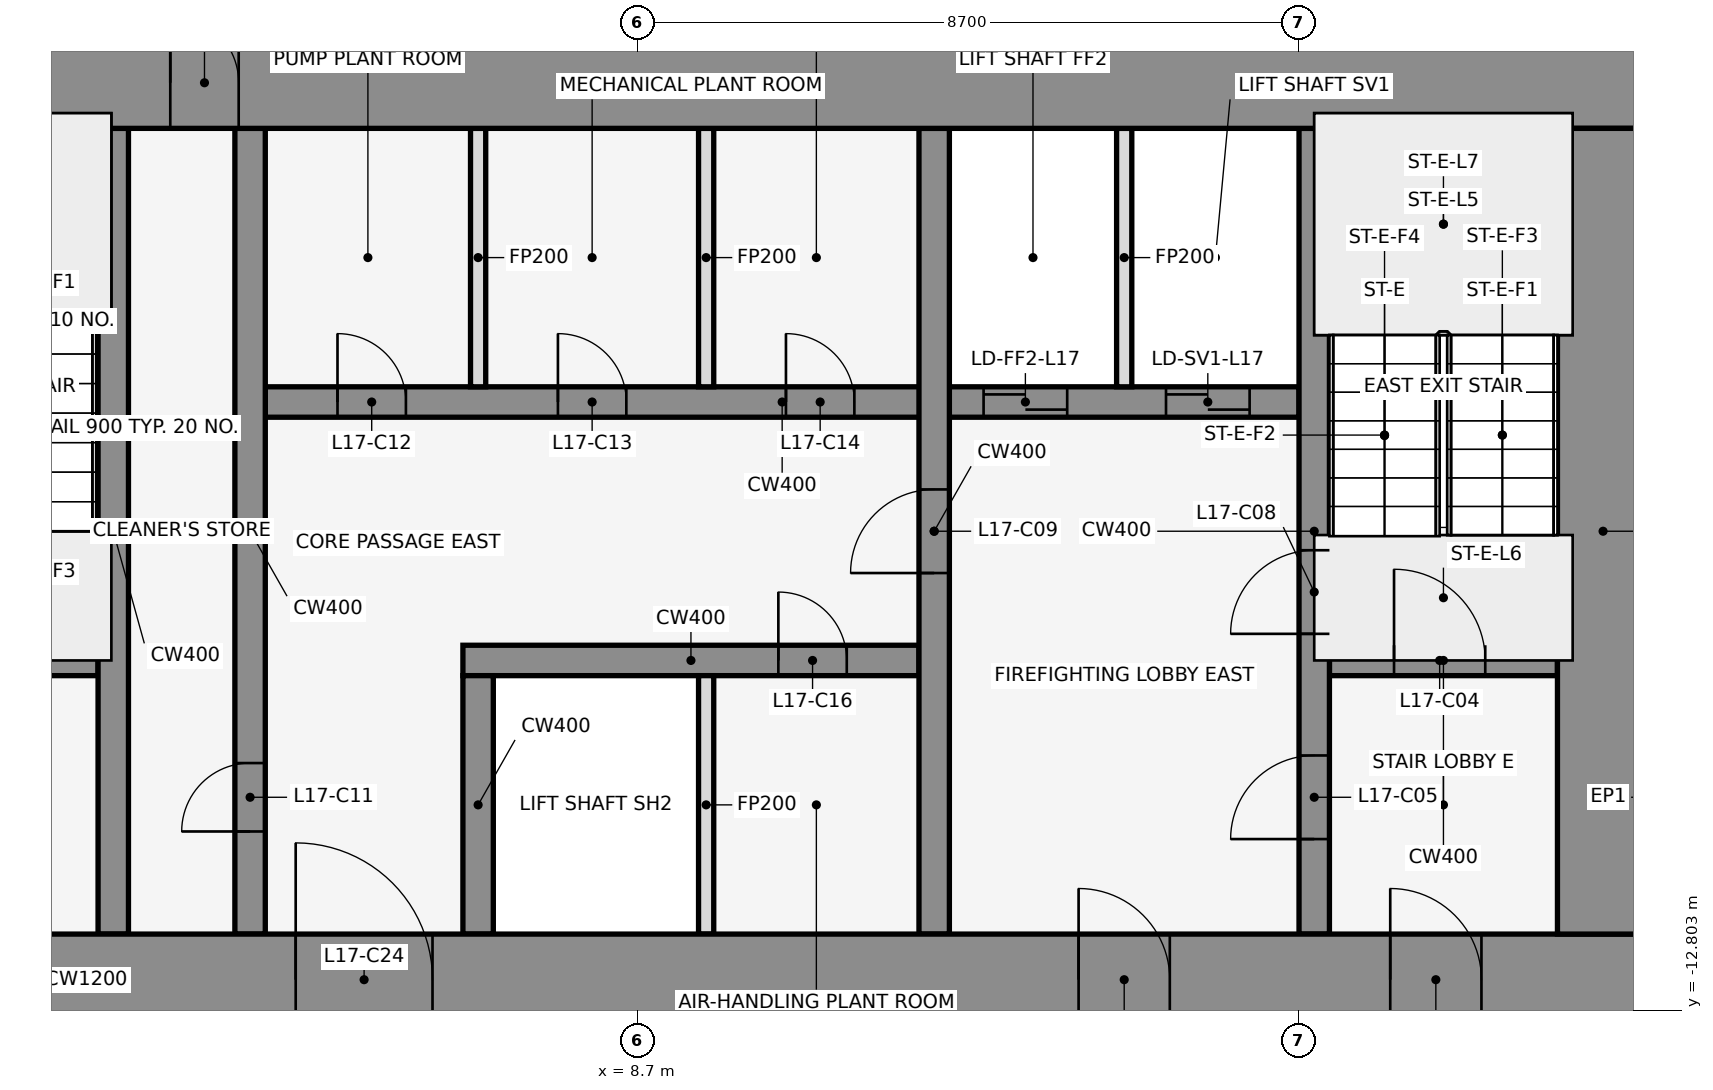
"""IFC4 building model, lengths in metres.
Left out: names, types, materials, properties, quantities, classifications, styles, units other than length and angle.
Written with IfcOpenShell. Run it as: python <this file> out.ifc"""

import sys

from ifc_helpers import new_model, si_unit, direction, frame, frame_2d, origin, place, context, subcontext, project, spatial, rectangle, extrude, element, fill, save


model = new_model("IFC4")
c1 = context("Model", 3, precision=1e-05, world=origin(), true_north=direction((0.0, 1.0)))
c2 = subcontext(c1, "Body", "Model", "MODEL_VIEW")
j1 = project(units=[si_unit("LENGTHUNIT", "METRE"), si_unit("PLANEANGLEUNIT", "RADIAN")], contexts=[c1])
p1 = place(None, origin())
s1 = spatial("IfcSite", under=j1, at=p1, CompositionType="ELEMENT")
p2 = place(p1, origin())
s2 = spatial("IfcBuilding", under=s1, at=p2, CompositionType="ELEMENT")
p3 = place(p2, frame((0.0, 0.0, 84.5)))
s3 = spatial("IfcBuildingStorey", under=s2, at=p3, CompositionType="ELEMENT", Elevation=84.5)
for number, where, z_axis, x_axis in (
    (1, (16.432, -0.105, 0.0), (0.0, 0.0, 1.0), (-0.84, 0.543, 0.0)),
    (2, (1.901, 1.08, 0.0), (0.0, 0.0, 1.0), (-0.84, -0.543, 0.0)),
):
    element("IfcWall", number, at=place(p3, frame(where, z_axis=z_axis, x_axis=x_axis)), inside=s3, PredefinedType="STANDARD", context=c2, shape_type="SweptSolid", body=[
        extrude(rectangle(XDim=2.183, YDim=0.25, at=frame_2d((1.091, 0.0))), origin(), (0.0, 0.0, 1.0), 5.25),
    ])
p4 = place(p3, frame((-1.6, -8.2, 0.0), z_axis=(0.0, 0.0, 1.0), x_axis=(1.0, 0.0, 0.0)))
e3 = element("IfcWall", 3, at=p4, inside=s3, PredefinedType="SHEAR", context=c2, shape_type="SweptSolid", body=[
    extrude(rectangle(XDim=3.2, YDim=0.4, at=frame_2d((1.6, 0.0))), origin(), (0.0, 0.0, 1.0), 5.4),
])
p5 = place(p4, frame((1.05, 0.0, 0.0)))
e4 = element("IfcOpeningElement", 4, at=p5, cuts=e3, PredefinedType="OPENING", context=c2, shape_type="SweptSolid", body=[
    extrude(rectangle(XDim=1.2, YDim=2.1, at=frame_2d((0.6, 1.05))), frame((0.0, 0.212, 0.0), z_axis=(0.0, -1.0, 0.0), x_axis=(1.0, 0.0, 0.0)), (0.0, 0.0, 1.0), 0.424),
])
p6 = place(p3, frame((6.4, -8.2, 0.0), z_axis=(0.0, 0.0, 1.0), x_axis=(1.0, 0.0, 0.0)))
e5 = element("IfcWall", 5, at=p6, inside=s3, PredefinedType="SHEAR", context=c2, shape_type="SweptSolid", body=[
    extrude(rectangle(XDim=6.0, YDim=0.4, at=frame_2d((3.0, 0.0))), origin(), (0.0, 0.0, 1.0), 5.4),
])
p7 = place(p6, frame((4.15, 0.0, 0.0)))
e6 = element("IfcOpeningElement", 6, at=p7, cuts=e5, PredefinedType="OPENING", context=c2, shape_type="SweptSolid", body=[
    extrude(rectangle(XDim=0.9, YDim=2.1, at=frame_2d((0.45, 1.05))), frame((0.0, 0.212, 0.0), z_axis=(0.0, -1.0, 0.0), x_axis=(1.0, 0.0, 0.0)), (0.0, 0.0, 1.0), 0.424),
])
p8 = place(p3, frame((17.8, -8.2, 0.0), z_axis=(0.0, 0.0, 1.0), x_axis=(1.0, 0.0, 0.0)))
e7 = element("IfcWall", 7, at=p8, inside=s3, PredefinedType="SHEAR", context=c2, shape_type="SweptSolid", body=[
    extrude(rectangle(XDim=3.0, YDim=0.4, at=frame_2d((1.5, 0.0))), origin(), (0.0, 0.0, 1.0), 5.4),
])
p9 = place(p8, frame((0.85, 0.0, 0.0)))
e8 = element("IfcOpeningElement", 8, at=p9, cuts=e7, PredefinedType="OPENING", context=c2, shape_type="SweptSolid", body=[
    extrude(rectangle(XDim=1.2, YDim=2.1, at=frame_2d((0.6, 1.05))), frame((0.0, 0.212, 0.0), z_axis=(0.0, -1.0, 0.0), x_axis=(1.0, 0.0, 0.0)), (0.0, 0.0, 1.0), 0.424),
])
p10 = place(p3, frame((3.8, -4.8, 0.0), z_axis=(0.0, 0.0, 1.0), x_axis=(1.0, 0.0, 0.0)))
e9 = element("IfcWall", 9, at=p10, inside=s3, PredefinedType="SHEAR", context=c2, shape_type="SweptSolid", body=[
    extrude(rectangle(XDim=13.6, YDim=0.4, at=frame_2d((6.8, 0.0))), origin(), (0.0, 0.0, 1.0), 5.4),
])
p11 = place(p10, frame((9.45, 0.0, 0.0)))
e10 = element("IfcOpeningElement", 10, at=p11, cuts=e9, PredefinedType="OPENING", context=c2, shape_type="SweptSolid", body=[
    extrude(rectangle(XDim=1.1, YDim=2.1, at=frame_2d((0.55, 1.05))), frame((0.0, 0.212, 0.0), z_axis=(0.0, -1.0, 0.0), x_axis=(1.0, 0.0, 0.0)), (0.0, 0.0, 1.0), 0.424),
])
p12 = place(p10, frame((11.85, 0.0, 0.0)))
e11 = element("IfcOpeningElement", 11, at=p12, cuts=e9, PredefinedType="OPENING", context=c2, shape_type="SweptSolid", body=[
    extrude(rectangle(XDim=1.1, YDim=2.1, at=frame_2d((0.55, 1.05))), frame((0.0, 0.212, 0.0), z_axis=(0.0, -1.0, 0.0), x_axis=(1.0, 0.0, 0.0)), (0.0, 0.0, 1.0), 0.424),
])
p13 = place(p10, frame((0.95, 0.0, 0.0)))
e12 = element("IfcOpeningElement", 12, at=p13, cuts=e9, PredefinedType="OPENING", context=c2, shape_type="SweptSolid", body=[
    extrude(rectangle(XDim=0.9, YDim=2.1, at=frame_2d((0.45, 1.05))), frame((0.0, 0.212, 0.0), z_axis=(0.0, -1.0, 0.0), x_axis=(1.0, 0.0, 0.0)), (0.0, 0.0, 1.0), 0.424),
])
p14 = place(p10, frame((3.85, 0.0, 0.0)))
e13 = element("IfcOpeningElement", 13, at=p14, cuts=e9, PredefinedType="OPENING", context=c2, shape_type="SweptSolid", body=[
    extrude(rectangle(XDim=0.9, YDim=2.1, at=frame_2d((0.45, 1.05))), frame((0.0, 0.212, 0.0), z_axis=(0.0, -1.0, 0.0), x_axis=(1.0, 0.0, 0.0)), (0.0, 0.0, 1.0), 0.424),
])
p15 = place(p10, frame((6.85, 0.0, 0.0)))
e14 = element("IfcOpeningElement", 14, at=p15, cuts=e9, PredefinedType="OPENING", context=c2, shape_type="SweptSolid", body=[
    extrude(rectangle(XDim=0.9, YDim=2.1, at=frame_2d((0.45, 1.05))), frame((0.0, 0.212, 0.0), z_axis=(0.0, -1.0, 0.0), x_axis=(1.0, 0.0, 0.0)), (0.0, 0.0, 1.0), 0.424),
])
p16 = place(p3, frame((1.8, -11.8, 0.0), z_axis=(0.0, 0.0, 1.0), x_axis=(0.0, 1.0, 0.0)))
e15 = element("IfcWall", 15, at=p16, inside=s3, PredefinedType="SHEAR", context=c2, shape_type="SweptSolid", body=[
    extrude(rectangle(XDim=10.6, YDim=0.4, at=frame_2d((5.3, 0.0))), origin(), (0.0, 0.0, 1.0), 5.4),
])
p17 = place(p3, frame((3.6, -11.8, 0.0), z_axis=(0.0, 0.0, 1.0), x_axis=(0.0, 1.0, 0.0)))
e16 = element("IfcWall", 16, at=p17, inside=s3, PredefinedType="SHEAR", context=c2, shape_type="SweptSolid", body=[
    extrude(rectangle(XDim=10.6, YDim=0.4, at=frame_2d((5.3, 0.0))), origin(), (0.0, 0.0, 1.0), 5.4),
])
p18 = place(p17, frame((1.35, 0.0, 0.0)))
e17 = element("IfcOpeningElement", 17, at=p18, cuts=e16, PredefinedType="OPENING", context=c2, shape_type="SweptSolid", body=[
    extrude(rectangle(XDim=0.9, YDim=2.1, at=frame_2d((0.45, 1.05))), frame((0.0, 0.212, 0.0), z_axis=(0.0, -1.0, 0.0), x_axis=(1.0, 0.0, 0.0)), (0.0, 0.0, 1.0), 0.424),
])
p19 = place(p3, frame((6.6, -11.8, 0.0), z_axis=(0.0, 0.0, 1.0), x_axis=(0.0, 1.0, 0.0)))
e18 = element("IfcWall", 18, at=p19, inside=s3, PredefinedType="SHEAR", context=c2, shape_type="SweptSolid", body=[
    extrude(rectangle(XDim=3.4, YDim=0.4, at=frame_2d((1.7, 0.0))), origin(), (0.0, 0.0, 1.0), 5.4),
])
for number, where, z_axis, x_axis in (
    (19, (6.6, -4.6, 0.0), (0.0, 0.0, 1.0), (0.0, 1.0, 0.0)),
    (20, (9.6, -11.8, 0.0), (0.0, 0.0, 1.0), (0.0, 1.0, 0.0)),
    (21, (9.6, -4.6, 0.0), (0.0, 0.0, 1.0), (0.0, 1.0, 0.0)),
):
    element("IfcWall", number, at=place(p3, frame(where, z_axis=z_axis, x_axis=x_axis)), inside=s3, PredefinedType="PARTITIONING", context=c2, shape_type="SweptSolid", body=[
        extrude(rectangle(XDim=3.4, YDim=0.2, at=frame_2d((1.7, 0.0))), origin(), (0.0, 0.0, 1.0), 4.318),
    ])
p20 = place(p3, frame((12.6, -11.8, 0.0), z_axis=(0.0, 0.0, 1.0), x_axis=(0.0, 1.0, 0.0)))
e22 = element("IfcWall", 22, at=p20, inside=s3, PredefinedType="SHEAR", context=c2, shape_type="SweptSolid", body=[
    extrude(rectangle(XDim=10.6, YDim=0.4, at=frame_2d((5.3, 0.0))), origin(), (0.0, 0.0, 1.0), 5.4),
])
p21 = place(p20, frame((4.75, 0.0, 0.0)))
e23 = element("IfcOpeningElement", 23, at=p21, cuts=e22, PredefinedType="OPENING", context=c2, shape_type="SweptSolid", body=[
    extrude(rectangle(XDim=1.1, YDim=2.1, at=frame_2d((0.55, 1.05))), frame((0.0, 0.212, 0.0), z_axis=(0.0, -1.0, 0.0), x_axis=(1.0, 0.0, 0.0)), (0.0, 0.0, 1.0), 0.424),
])
p22 = place(p3, frame((15.1, -4.6, 0.0), z_axis=(0.0, 0.0, 1.0), x_axis=(0.0, 1.0, 0.0)))
e24 = element("IfcWall", 24, at=p22, inside=s3, PredefinedType="PARTITIONING", context=c2, shape_type="SweptSolid", body=[
    extrude(rectangle(XDim=3.4, YDim=0.2, at=frame_2d((1.7, 0.0))), origin(), (0.0, 0.0, 1.0), 4.318),
])
p23 = place(p3, frame((17.6, -11.8, 0.0), z_axis=(0.0, 0.0, 1.0), x_axis=(0.0, 1.0, 0.0)))
e25 = element("IfcWall", 25, at=p23, inside=s3, PredefinedType="SHEAR", context=c2, shape_type="SweptSolid", body=[
    extrude(rectangle(XDim=10.6, YDim=0.4, at=frame_2d((5.3, 0.0))), origin(), (0.0, 0.0, 1.0), 5.4),
])
p24 = place(p23, frame((1.25, 0.0, 0.0)))
e26 = element("IfcOpeningElement", 26, at=p24, cuts=e25, PredefinedType="OPENING", context=c2, shape_type="SweptSolid", body=[
    extrude(rectangle(XDim=1.1, YDim=2.1, at=frame_2d((0.55, 1.05))), frame((0.0, 0.212, 0.0), z_axis=(0.0, -1.0, 0.0), x_axis=(1.0, 0.0, 0.0)), (0.0, 0.0, 1.0), 0.424),
])
p25 = place(p23, frame((3.95, 0.0, 0.0)))
e27 = element("IfcOpeningElement", 27, at=p25, cuts=e25, PredefinedType="OPENING", context=c2, shape_type="SweptSolid", body=[
    extrude(rectangle(XDim=1.1, YDim=2.1, at=frame_2d((0.55, 1.05))), frame((0.0, 0.212, 0.0), z_axis=(0.0, -1.0, 0.0), x_axis=(1.0, 0.0, 0.0)), (0.0, 0.0, 1.0), 0.424),
])
p26 = place(p3, frame((-22.0, -0.6, 0.0), z_axis=(0.0, 0.0, 1.0), x_axis=(1.0, 0.0, 0.0)))
e28 = element("IfcWall", 28, at=p26, inside=s3, PredefinedType="SHEAR", context=c2, shape_type="SweptSolid", body=[
    extrude(rectangle(XDim=44.0, YDim=1.2, at=frame_2d((22.0, 0.0))), origin(), (0.0, 0.0, 1.0), 5.4),
])
p27 = place(p26, frame((18.55, 0.0, 0.0)))
e29 = element("IfcOpeningElement", 29, at=p27, cuts=e28, PredefinedType="OPENING", context=c2, shape_type="SweptSolid", body=[
    extrude(rectangle(XDim=0.9, YDim=2.1, at=frame_2d((0.45, 1.05))), frame((0.0, 0.612, 0.0), z_axis=(0.0, -1.0, 0.0), x_axis=(1.0, 0.0, 0.0)), (0.0, 0.0, 1.0), 1.224),
])
p28 = place(p26, frame((24.55, 0.0, 0.0)))
e30 = element("IfcOpeningElement", 30, at=p28, cuts=e28, PredefinedType="OPENING", context=c2, shape_type="SweptSolid", body=[
    extrude(rectangle(XDim=0.9, YDim=2.1, at=frame_2d((0.45, 1.05))), frame((0.0, 0.612, 0.0), z_axis=(0.0, -1.0, 0.0), x_axis=(1.0, 0.0, 0.0)), (0.0, 0.0, 1.0), 1.224),
])
p29 = place(p3, frame((-22.0, -12.4, 0.0), z_axis=(0.0, 0.0, 1.0), x_axis=(1.0, 0.0, 0.0)))
e31 = element("IfcWall", 31, at=p29, inside=s3, PredefinedType="SHEAR", context=c2, shape_type="SweptSolid", body=[
    extrude(rectangle(XDim=44.0, YDim=1.2, at=frame_2d((22.0, 0.0))), origin(), (0.0, 0.0, 1.0), 5.4),
])
p30 = place(p29, frame((2.2, 0.0, 0.0)))
e32 = element("IfcOpeningElement", 32, at=p30, cuts=e31, PredefinedType="OPENING", context=c2, shape_type="SweptSolid", body=[
    extrude(rectangle(XDim=1.2, YDim=2.1, at=frame_2d((0.6, 1.05))), frame((0.0, 0.612, 0.0), z_axis=(0.0, -1.0, 0.0), x_axis=(1.0, 0.0, 0.0)), (0.0, 0.0, 1.0), 1.224),
])
p31 = place(p29, frame((21.4, 0.0, 0.0)))
e33 = element("IfcOpeningElement", 33, at=p31, cuts=e31, PredefinedType="OPENING", context=c2, shape_type="SweptSolid", body=[
    extrude(rectangle(XDim=1.2, YDim=2.1, at=frame_2d((0.6, 1.05))), frame((0.0, 0.612, 0.0), z_axis=(0.0, -1.0, 0.0), x_axis=(1.0, 0.0, 0.0)), (0.0, 0.0, 1.0), 1.224),
])
p32 = place(p29, frame((40.6, 0.0, 0.0)))
e34 = element("IfcOpeningElement", 34, at=p32, cuts=e31, PredefinedType="OPENING", context=c2, shape_type="SweptSolid", body=[
    extrude(rectangle(XDim=1.2, YDim=2.1, at=frame_2d((0.6, 1.05))), frame((0.0, 0.612, 0.0), z_axis=(0.0, -1.0, 0.0), x_axis=(1.0, 0.0, 0.0)), (0.0, 0.0, 1.0), 1.224),
])
p33 = place(p29, frame((16.0, 0.0, 0.0)))
e35 = element("IfcOpeningElement", 35, at=p33, cuts=e31, PredefinedType="OPENING", context=c2, shape_type="SweptSolid", body=[
    extrude(rectangle(XDim=1.8, YDim=2.1, at=frame_2d((0.9, 1.05))), frame((0.0, 0.612, 0.0), z_axis=(0.0, -1.0, 0.0), x_axis=(1.0, 0.0, 0.0)), (0.0, 0.0, 1.0), 1.224),
])
p34 = place(p29, frame((6.3, 0.0, 0.0)))
e36 = element("IfcOpeningElement", 36, at=p34, cuts=e31, PredefinedType="OPENING", context=c2, shape_type="SweptSolid", body=[
    extrude(rectangle(XDim=1.2, YDim=2.1, at=frame_2d((0.6, 1.05))), frame((0.0, 0.612, 0.0), z_axis=(0.0, -1.0, 0.0), x_axis=(1.0, 0.0, 0.0)), (0.0, 0.0, 1.0), 1.224),
])
p35 = place(p29, frame((26.2, 0.0, 0.0)))
e37 = element("IfcOpeningElement", 37, at=p35, cuts=e31, PredefinedType="OPENING", context=c2, shape_type="SweptSolid", body=[
    extrude(rectangle(XDim=1.8, YDim=2.1, at=frame_2d((0.9, 1.05))), frame((0.0, 0.612, 0.0), z_axis=(0.0, -1.0, 0.0), x_axis=(1.0, 0.0, 0.0)), (0.0, 0.0, 1.0), 1.224),
])
p36 = place(p29, frame((36.5, 0.0, 0.0)))
e38 = element("IfcOpeningElement", 38, at=p36, cuts=e31, PredefinedType="OPENING", context=c2, shape_type="SweptSolid", body=[
    extrude(rectangle(XDim=1.2, YDim=2.1, at=frame_2d((0.6, 1.05))), frame((0.0, 0.612, 0.0), z_axis=(0.0, -1.0, 0.0), x_axis=(1.0, 0.0, 0.0)), (0.0, 0.0, 1.0), 1.224),
])
p37 = place(p3, frame((21.4, -11.8, 0.0), z_axis=(0.0, 0.0, 1.0), x_axis=(0.0, 1.0, 0.0)))
e39 = element("IfcWall", 39, at=p37, inside=s3, PredefinedType="SHEAR", context=c2, shape_type="SweptSolid", body=[
    extrude(rectangle(XDim=10.6, YDim=1.2, at=frame_2d((5.3, 0.0))), origin(), (0.0, 0.0, 1.0), 5.4),
])
p38 = place(p9, origin())
e40 = element("IfcDoor", 40, at=p38, inside=s3, OperationType="SINGLE_SWING_RIGHT", PredefinedType="DOOR", context=c2, shape_type="SweptSolid", body=[
    extrude(rectangle(XDim=1.2, YDim=2.1, at=frame_2d((0.6, 1.05))), frame((0.0, 0.025, 0.0), z_axis=(0.0, -1.0, 0.0), x_axis=(1.0, 0.0, 0.0)), (0.0, 0.0, 1.0), 0.05),
])
fill(e8, e40)
p39 = place(p24, origin())
e41 = element("IfcDoor", 41, at=p39, inside=s3, OperationType="SINGLE_SWING_LEFT", PredefinedType="DOOR", context=c2, shape_type="SweptSolid", body=[
    extrude(rectangle(XDim=1.1, YDim=2.1, at=frame_2d((0.55, 1.05))), frame((0.0, 0.025, 0.0), z_axis=(0.0, -1.0, 0.0), x_axis=(1.0, 0.0, 0.0)), (0.0, 0.0, 1.0), 0.05),
])
fill(e26, e41)
p40 = place(p11, origin())
e42 = element("IfcDoor", 42, at=p40, inside=s3, OperationType="DOUBLE_DOOR_SLIDING", PredefinedType="DOOR", context=c2, shape_type="SweptSolid", body=[
    extrude(rectangle(XDim=1.1, YDim=2.1, at=frame_2d((0.55, 1.05))), frame((0.0, 0.025, 0.0), z_axis=(0.0, -1.0, 0.0), x_axis=(1.0, 0.0, 0.0)), (0.0, 0.0, 1.0), 0.05),
])
fill(e10, e42)
p41 = place(p12, origin())
e43 = element("IfcDoor", 43, at=p41, inside=s3, OperationType="DOUBLE_DOOR_SLIDING", PredefinedType="DOOR", context=c2, shape_type="SweptSolid", body=[
    extrude(rectangle(XDim=1.1, YDim=2.1, at=frame_2d((0.55, 1.05))), frame((0.0, 0.025, 0.0), z_axis=(0.0, -1.0, 0.0), x_axis=(1.0, 0.0, 0.0)), (0.0, 0.0, 1.0), 0.05),
])
fill(e11, e43)
p42 = place(p25, origin())
e44 = element("IfcDoor", 44, at=p42, inside=s3, OperationType="SINGLE_SWING_RIGHT", PredefinedType="DOOR", context=c2, shape_type="SweptSolid", body=[
    extrude(rectangle(XDim=1.1, YDim=2.1, at=frame_2d((0.55, 1.05))), frame((0.0, 0.025, 0.0), z_axis=(0.0, -1.0, 0.0), x_axis=(1.0, 0.0, 0.0)), (0.0, 0.0, 1.0), 0.05),
])
fill(e27, e44)
p43 = place(p21, frame((1.1, 0.0, 0.0), z_axis=(0.0, 0.0, 1.0), x_axis=(-1.0, 0.0, 0.0)))
e45 = element("IfcDoor", 45, at=p43, inside=s3, OperationType="SINGLE_SWING_RIGHT", PredefinedType="DOOR", context=c2, shape_type="SweptSolid", body=[
    extrude(rectangle(XDim=1.1, YDim=2.1, at=frame_2d((0.55, 1.05))), frame((0.0, 0.025, 0.0), z_axis=(0.0, -1.0, 0.0), x_axis=(1.0, 0.0, 0.0)), (0.0, 0.0, 1.0), 0.05),
])
fill(e23, e45)
p44 = place(p18, origin())
e46 = element("IfcDoor", 46, at=p44, inside=s3, OperationType="SINGLE_SWING_LEFT", PredefinedType="DOOR", context=c2, shape_type="SweptSolid", body=[
    extrude(rectangle(XDim=0.9, YDim=2.1, at=frame_2d((0.45, 1.05))), frame((0.0, 0.025, 0.0), z_axis=(0.0, -1.0, 0.0), x_axis=(1.0, 0.0, 0.0)), (0.0, 0.0, 1.0), 0.05),
])
fill(e17, e46)
p45 = place(p13, origin())
e47 = element("IfcDoor", 47, at=p45, inside=s3, OperationType="SINGLE_SWING_RIGHT", PredefinedType="DOOR", context=c2, shape_type="SweptSolid", body=[
    extrude(rectangle(XDim=0.9, YDim=2.1, at=frame_2d((0.45, 1.05))), frame((0.0, 0.025, 0.0), z_axis=(0.0, -1.0, 0.0), x_axis=(1.0, 0.0, 0.0)), (0.0, 0.0, 1.0), 0.05),
])
fill(e12, e47)
p46 = place(p14, origin())
e48 = element("IfcDoor", 48, at=p46, inside=s3, OperationType="SINGLE_SWING_LEFT", PredefinedType="DOOR", context=c2, shape_type="SweptSolid", body=[
    extrude(rectangle(XDim=0.9, YDim=2.1, at=frame_2d((0.45, 1.05))), frame((0.0, 0.025, 0.0), z_axis=(0.0, -1.0, 0.0), x_axis=(1.0, 0.0, 0.0)), (0.0, 0.0, 1.0), 0.05),
])
fill(e13, e48)
p47 = place(p15, origin())
e49 = element("IfcDoor", 49, at=p47, inside=s3, OperationType="SINGLE_SWING_RIGHT", PredefinedType="DOOR", context=c2, shape_type="SweptSolid", body=[
    extrude(rectangle(XDim=0.9, YDim=2.1, at=frame_2d((0.45, 1.05))), frame((0.0, 0.025, 0.0), z_axis=(0.0, -1.0, 0.0), x_axis=(1.0, 0.0, 0.0)), (0.0, 0.0, 1.0), 0.05),
])
fill(e14, e49)
p48 = place(p7, frame((0.9, 0.0, 0.0), z_axis=(0.0, 0.0, 1.0), x_axis=(-1.0, 0.0, 0.0)))
e50 = element("IfcDoor", 50, at=p48, inside=s3, OperationType="SINGLE_SWING_LEFT", PredefinedType="DOOR", context=c2, shape_type="SweptSolid", body=[
    extrude(rectangle(XDim=0.9, YDim=2.1, at=frame_2d((0.45, 1.05))), frame((0.0, 0.025, 0.0), z_axis=(0.0, -1.0, 0.0), x_axis=(1.0, 0.0, 0.0)), (0.0, 0.0, 1.0), 0.05),
])
fill(e6, e50)
p49 = place(p28, origin())
e51 = element("IfcDoor", 51, at=p49, inside=s3, OperationType="SINGLE_SWING_LEFT", PredefinedType="DOOR", context=c2, shape_type="SweptSolid", body=[
    extrude(rectangle(XDim=0.9, YDim=2.1, at=frame_2d((0.45, 1.05))), frame((0.0, 0.025, 0.0), z_axis=(0.0, -1.0, 0.0), x_axis=(1.0, 0.0, 0.0)), (0.0, 0.0, 1.0), 0.05),
])
fill(e30, e51)
p50 = place(p32, frame((1.2, 0.0, 0.0), z_axis=(0.0, 0.0, 1.0), x_axis=(-1.0, 0.0, 0.0)))
e52 = element("IfcDoor", 52, at=p50, inside=s3, OperationType="SINGLE_SWING_RIGHT", PredefinedType="DOOR", context=c2, shape_type="SweptSolid", body=[
    extrude(rectangle(XDim=1.2, YDim=2.1, at=frame_2d((0.6, 1.05))), frame((0.0, 0.025, 0.0), z_axis=(0.0, -1.0, 0.0), x_axis=(1.0, 0.0, 0.0)), (0.0, 0.0, 1.0), 0.05),
])
fill(e34, e52)
p51 = place(p35, origin())
e53 = element("IfcDoor", 53, at=p51, inside=s3, OperationType="SINGLE_SWING_LEFT", PredefinedType="DOOR", context=c2, shape_type="SweptSolid", body=[
    extrude(rectangle(XDim=1.8, YDim=2.1, at=frame_2d((0.9, 1.05))), frame((0.0, 0.025, 0.0), z_axis=(0.0, -1.0, 0.0), x_axis=(1.0, 0.0, 0.0)), (0.0, 0.0, 1.0), 0.05),
])
fill(e37, e53)
p52 = place(p36, frame((1.2, 0.0, 0.0), z_axis=(0.0, 0.0, 1.0), x_axis=(-1.0, 0.0, 0.0)))
e54 = element("IfcDoor", 54, at=p52, inside=s3, OperationType="SINGLE_SWING_RIGHT", PredefinedType="DOOR", context=c2, shape_type="SweptSolid", body=[
    extrude(rectangle(XDim=1.2, YDim=2.1, at=frame_2d((0.6, 1.05))), frame((0.0, 0.025, 0.0), z_axis=(0.0, -1.0, 0.0), x_axis=(1.0, 0.0, 0.0)), (0.0, 0.0, 1.0), 0.05),
])
fill(e38, e54)
save(model, sys.argv[1])
